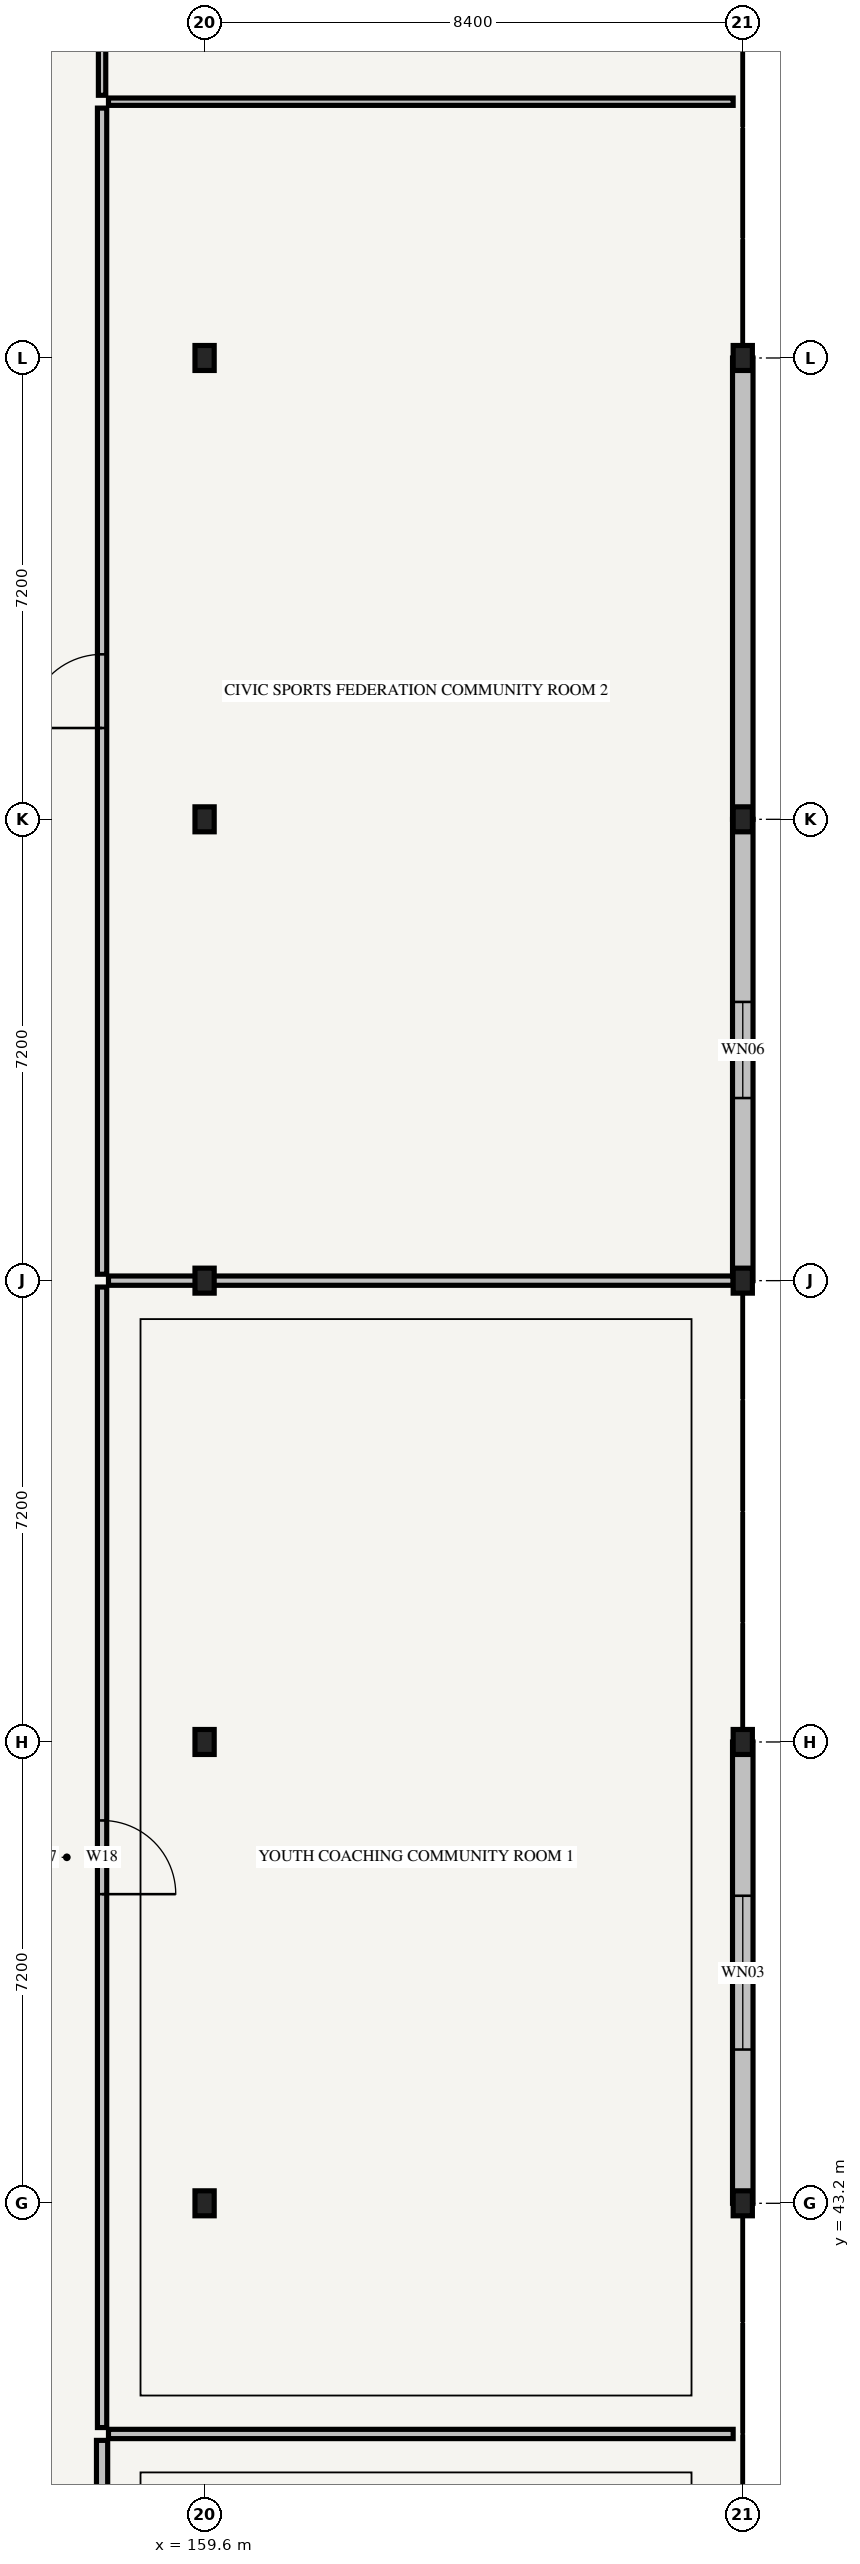
"""IFC4 building model, lengths in metres.
Left out: names, types, materials, properties, quantities, classifications, styles, units other than length and angle.
Written with IfcOpenShell. Run it as: python <this file> out.ifc"""

import sys

from ifc_helpers import new_model, si_unit, direction, frame, frame_2d, origin, origin_2d, place, context, subcontext, project, spatial, rectangle, i_section, extrude, element, fill, save


model = new_model("IFC4")
c1 = context("Model", 3, precision=1e-05, world=origin(), true_north=direction((0.0, 1.0)))
c2 = subcontext(c1, "Body", "Model", "MODEL_VIEW")
j1 = project(units=[si_unit("LENGTHUNIT", "METRE"), si_unit("PLANEANGLEUNIT", "RADIAN")], contexts=[c1])
p1 = place(None, origin())
s1 = spatial("IfcSite", under=j1, at=p1, CompositionType="ELEMENT")
p2 = place(p1, origin())
s2 = spatial("IfcBuilding", under=s1, at=p2, CompositionType="ELEMENT")
p3 = place(p2, frame((0.0, 0.0, 12.9)))
s3 = spatial("IfcBuildingStorey", under=s2, at=p3, CompositionType="ELEMENT", Elevation=12.9)
for number, where, z_axis, x_axis in (
    (1, (159.6, 43.2, 0.0), (0.0, 0.0, 1.0), (1.0, 0.0, 0.0)),
    (2, (159.6, 50.4, 0.0), (0.0, 0.0, 1.0), (1.0, 0.0, 0.0)),
    (3, (159.6, 57.6, 0.0), (0.0, 0.0, 1.0), (1.0, 0.0, 0.0)),
    (4, (159.6, 64.8, 0.0), (0.0, 0.0, 1.0), (1.0, 0.0, 0.0)),
    (5, (159.6, 72.0, 0.0), (0.0, 0.0, 1.0), (1.0, 0.0, 0.0)),
    (6, (168.0, 43.2, 0.0), (0.0, 0.0, 1.0), (1.0, 0.0, 0.0)),
    (7, (168.0, 50.4, 0.0), (0.0, 0.0, 1.0), (1.0, 0.0, 0.0)),
    (8, (168.0, 57.6, 0.0), (0.0, 0.0, 1.0), (1.0, 0.0, 0.0)),
    (9, (168.0, 64.8, 0.0), (0.0, 0.0, 1.0), (1.0, 0.0, 0.0)),
    (10, (168.0, 72.0, 0.0), (0.0, 0.0, 1.0), (1.0, 0.0, 0.0)),
):
    element("IfcColumn", number, at=place(p3, frame(where, z_axis=z_axis, x_axis=x_axis)), inside=s3, PredefinedType="COLUMN", context=c2, shape_type="SweptSolid", body=[
        extrude(i_section(OverallWidth=0.3, OverallDepth=0.39, WebThickness=0.011, FlangeThickness=0.019, FilletRadius=0.027, at=origin_2d()), origin(), (0.0, 0.0, 1.0), 4.2),
    ])
p4 = place(p3, frame((168.0, 43.2, 0.0), z_axis=(0.0, 0.0, 1.0), x_axis=(0.0, 1.0, 0.0)))
e11 = element("IfcWall", 11, at=p4, inside=s3, PredefinedType="STANDARD", context=c2, shape_type="SweptSolid", body=[
    extrude(rectangle(XDim=7.2, YDim=0.32, at=frame_2d((3.6, 0.0))), origin(), (0.0, 0.0, 1.0), 3.445),
])
p5 = place(p4, frame((2.4, 0.0, 0.85)))
e12 = element("IfcOpeningElement", 12, at=p5, cuts=e11, PredefinedType="OPENING", context=c2, shape_type="SweptSolid", body=[
    extrude(rectangle(XDim=2.4, YDim=2.4, at=frame_2d((1.2, 1.2))), frame((0.0, 0.185, 0.0), z_axis=(0.0, -1.0, 0.0), x_axis=(1.0, 0.0, 0.0)), (0.0, 0.0, 1.0), 0.37),
])
p6 = place(p3, frame((168.0, 57.6, 0.0), z_axis=(0.0, 0.0, 1.0), x_axis=(0.0, 1.0, 0.0)))
e13 = element("IfcWall", 13, at=p6, inside=s3, PredefinedType="STANDARD", context=c2, shape_type="SweptSolid", body=[
    extrude(rectangle(XDim=7.2, YDim=0.32, at=frame_2d((3.6, 0.0))), origin(), (0.0, 0.0, 1.0), 3.345),
])
p7 = place(p6, frame((2.85, 0.0, 0.85)))
e14 = element("IfcOpeningElement", 14, at=p7, cuts=e13, PredefinedType="OPENING", context=c2, shape_type="SweptSolid", body=[
    extrude(rectangle(XDim=1.5, YDim=1.8, at=frame_2d((0.75, 0.9))), frame((0.0, 0.185, 0.0), z_axis=(0.0, -1.0, 0.0), x_axis=(1.0, 0.0, 0.0)), (0.0, 0.0, 1.0), 0.37),
])
p8 = place(p3, frame((168.0, 64.8, 0.0), z_axis=(0.0, 0.0, 1.0), x_axis=(0.0, 1.0, 0.0)))
e15 = element("IfcWall", 15, at=p8, inside=s3, PredefinedType="STANDARD", context=c2, shape_type="SweptSolid", body=[
    extrude(rectangle(XDim=7.2, YDim=0.32, at=frame_2d((3.6, 0.0))), origin(), (0.0, 0.0, 1.0), 3.395),
])
p9 = place(p3, frame((158.0, 14.55, 0.0), z_axis=(0.0, 0.0, 1.0), x_axis=(0.0, 1.0, 0.0)))
e16 = element("IfcWall", 16, at=p9, inside=s3, PredefinedType="PARTITIONING", context=c2, shape_type="SweptSolid", body=[
    extrude(rectangle(XDim=24.95, YDim=0.175, at=frame_2d((12.475, 0.0))), origin(), (0.0, 0.0, 1.0), 3.32),
])
p10 = place(p9, frame((11.7, 0.0, 0.0)))
e17 = element("IfcOpeningElement", 17, at=p10, cuts=e16, PredefinedType="OPENING", context=c2, shape_type="SweptSolid", body=[
    extrude(rectangle(XDim=1.55, YDim=2.25, at=frame_2d((0.775, 1.125))), frame((0.0, 0.112, 0.0), z_axis=(0.0, -1.0, 0.0), x_axis=(1.0, 0.0, 0.0)), (0.0, 0.0, 1.0), 0.225),
])
p11 = place(p3, frame((158.0, 39.7, 0.0), z_axis=(0.0, 0.0, 1.0), x_axis=(0.0, 1.0, 0.0)))
e18 = element("IfcWall", 18, at=p11, inside=s3, PredefinedType="PARTITIONING", context=c2, shape_type="SweptSolid", body=[
    extrude(rectangle(XDim=17.8, YDim=0.145, at=frame_2d((8.9, 0.0))), origin(), (0.0, 0.0, 1.0), 3.32),
])
p12 = place(p11, frame((8.325, 0.0, 0.0)))
e19 = element("IfcOpeningElement", 19, at=p12, cuts=e18, PredefinedType="OPENING", context=c2, shape_type="SweptSolid", body=[
    extrude(rectangle(XDim=1.15, YDim=2.15, at=frame_2d((0.575, 1.075))), frame((0.0, 0.097, 0.0), z_axis=(0.0, -1.0, 0.0), x_axis=(1.0, 0.0, 0.0)), (0.0, 0.0, 1.0), 0.195),
])
p13 = place(p3, frame((158.0, 57.7, 0.0), z_axis=(0.0, 0.0, 1.0), x_axis=(0.0, 1.0, 0.0)))
e20 = element("IfcWall", 20, at=p13, inside=s3, PredefinedType="PARTITIONING", context=c2, shape_type="SweptSolid", body=[
    extrude(rectangle(XDim=18.2, YDim=0.145, at=frame_2d((9.1, 0.0))), origin(), (0.0, 0.0, 1.0), 3.32),
])
p14 = place(p13, frame((8.525, 0.0, 0.0)))
e21 = element("IfcOpeningElement", 21, at=p14, cuts=e20, PredefinedType="OPENING", context=c2, shape_type="SweptSolid", body=[
    extrude(rectangle(XDim=1.15, YDim=2.15, at=frame_2d((0.575, 1.075))), frame((0.0, 0.097, 0.0), z_axis=(0.0, -1.0, 0.0), x_axis=(1.0, 0.0, 0.0)), (0.0, 0.0, 1.0), 0.195),
])
for number, where, z_axis, x_axis in (
    (22, (158.1, 39.6, 0.0), (0.0, 0.0, 1.0), (1.0, 0.0, 0.0)),
    (23, (158.1, 57.6, 0.0), (0.0, 0.0, 1.0), (1.0, 0.0, 0.0)),
):
    element("IfcWall", number, at=place(p3, frame(where, z_axis=z_axis, x_axis=x_axis)), inside=s3, PredefinedType="PARTITIONING", context=c2, shape_type="SweptSolid", body=[
        extrude(rectangle(XDim=9.75, YDim=0.145, at=frame_2d((4.875, 0.0))), origin(), (0.0, 0.0, 1.0), 3.32),
    ])
p15 = place(p3, frame((158.0, 76.1, 0.0), z_axis=(0.0, 0.0, 1.0), x_axis=(0.0, 1.0, 0.0)))
e24 = element("IfcWall", 24, at=p15, inside=s3, PredefinedType="PARTITIONING", context=c2, shape_type="SweptSolid", body=[
    extrude(rectangle(XDim=10.15, YDim=0.115, at=frame_2d((5.075, 0.0))), origin(), (0.0, 0.0, 1.0), 3.32),
])
p16 = place(p15, frame((4.45, 0.0, 0.0)))
e25 = element("IfcOpeningElement", 25, at=p16, cuts=e24, PredefinedType="OPENING", context=c2, shape_type="SweptSolid", body=[
    extrude(rectangle(XDim=1.25, YDim=2.2, at=frame_2d((0.625, 1.1))), frame((0.0, 0.083, 0.0), z_axis=(0.0, -1.0, 0.0), x_axis=(1.0, 0.0, 0.0)), (0.0, 0.0, 1.0), 0.165),
])
p17 = place(p3, frame((158.1, 76.0, 0.0), z_axis=(0.0, 0.0, 1.0), x_axis=(1.0, 0.0, 0.0)))
e26 = element("IfcWall", 26, at=p17, inside=s3, PredefinedType="PARTITIONING", context=c2, shape_type="SweptSolid", body=[
    extrude(rectangle(XDim=9.75, YDim=0.115, at=frame_2d((4.875, 0.0))), origin(), (0.0, 0.0, 1.0), 3.32),
])
p18 = place(p5, origin())
e27 = element("IfcWindow", 27, at=p18, inside=s3, PartitioningType="SINGLE_PANEL", PredefinedType="WINDOW", context=c2, shape_type="SweptSolid", body=[
    extrude(rectangle(XDim=2.4, YDim=2.4, at=frame_2d((1.2, 1.2))), frame((0.0, 0.03, 0.0), z_axis=(0.0, -1.0, 0.0), x_axis=(1.0, 0.0, 0.0)), (0.0, 0.0, 1.0), 0.06),
])
fill(e12, e27)
p19 = place(p7, origin())
e28 = element("IfcWindow", 28, at=p19, inside=s3, PartitioningType="SINGLE_PANEL", PredefinedType="WINDOW", context=c2, shape_type="SweptSolid", body=[
    extrude(rectangle(XDim=1.5, YDim=1.8, at=frame_2d((0.75, 0.9))), frame((0.0, 0.03, 0.0), z_axis=(0.0, -1.0, 0.0), x_axis=(1.0, 0.0, 0.0)), (0.0, 0.0, 1.0), 0.06),
])
fill(e14, e28)
p20 = place(p12, origin())
e29 = element("IfcDoor", 29, at=p20, inside=s3, OperationType="SINGLE_SWING_RIGHT", PredefinedType="DOOR", context=c2, shape_type="SweptSolid", body=[
    extrude(rectangle(XDim=1.15, YDim=2.15, at=frame_2d((0.575, 1.075))), frame((0.0, 0.025, 0.0), z_axis=(0.0, -1.0, 0.0), x_axis=(1.0, 0.0, 0.0)), (0.0, 0.0, 1.0), 0.05),
])
fill(e19, e29)
p21 = place(p14, frame((1.15, 0.0, 0.0), z_axis=(0.0, 0.0, 1.0), x_axis=(-1.0, 0.0, 0.0)))
e30 = element("IfcDoor", 30, at=p21, inside=s3, OperationType="SINGLE_SWING_LEFT", PredefinedType="DOOR", context=c2, shape_type="SweptSolid", body=[
    extrude(rectangle(XDim=1.15, YDim=2.15, at=frame_2d((0.575, 1.075))), frame((0.0, 0.025, 0.0), z_axis=(0.0, -1.0, 0.0), x_axis=(1.0, 0.0, 0.0)), (0.0, 0.0, 1.0), 0.05),
])
fill(e21, e30)
save(model, sys.argv[1])
